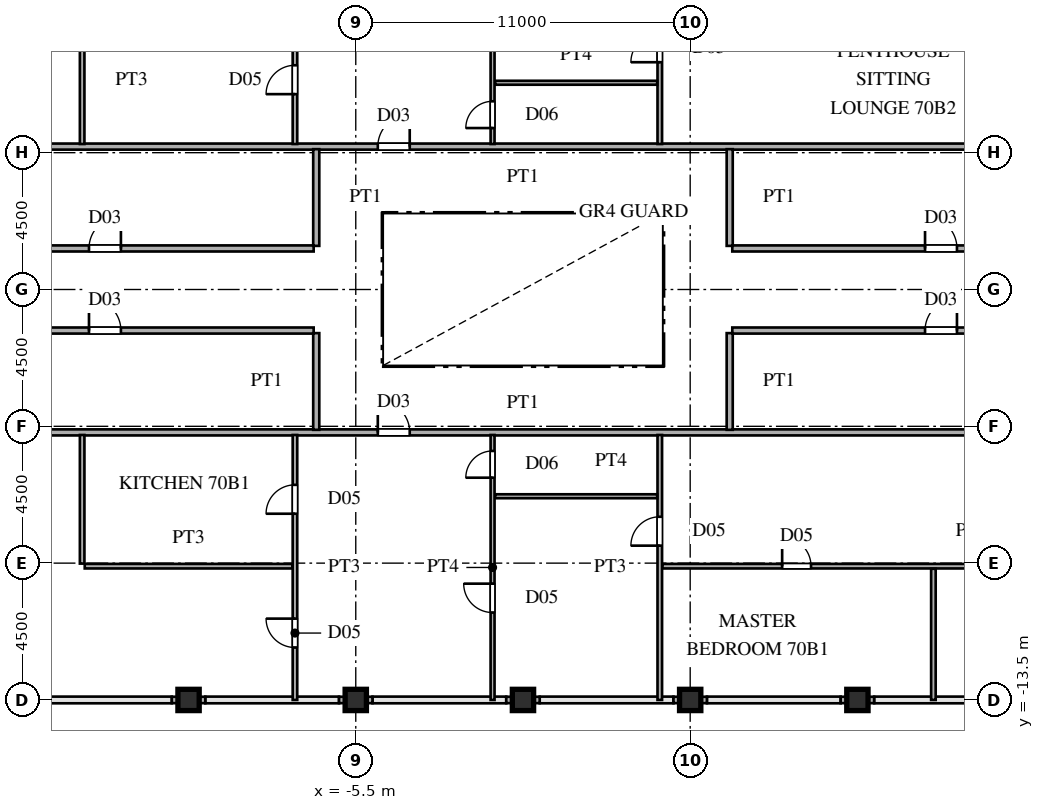
"""IFC4 building model, lengths in metres.
Left out: names, types, materials, properties, quantities, classifications, styles, units other than length and angle.
Written with IfcOpenShell. Run it as: python <this file> out.ifc"""

import sys

from ifc_helpers import new_model, si_unit, direction, frame, frame_2d, origin, origin_2d, place, context, subcontext, project, spatial, rectangle, hollow_rectangle, extrude, source, transform, mapped, element, fill, save


model = new_model("IFC4")
c1 = context("Model", 3, precision=1e-05, world=origin(), true_north=direction((0.0, 1.0)))
c2 = subcontext(c1, "Body", "Model", "MODEL_VIEW")
j1 = project(units=[si_unit("LENGTHUNIT", "METRE"), si_unit("PLANEANGLEUNIT", "RADIAN")], contexts=[c1])
p1 = place(None, origin())
s1 = spatial("IfcSite", under=j1, at=p1, CompositionType="ELEMENT")
p2 = place(p1, origin())
s2 = spatial("IfcBuilding", under=s1, at=p2, CompositionType="ELEMENT")
p3 = place(p2, frame((0.0, 0.0, 265.65)))
s3 = spatial("IfcBuildingStorey", under=s2, at=p3, CompositionType="ELEMENT", Elevation=265.65)
m1 = source(origin(), c2, "Body", "SweptSolid", [
    extrude(hollow_rectangle(XDim=0.7, YDim=0.7, WallThickness=0.03, at=origin_2d()), origin(), (0.0, 0.0, 1.0), 3.75),
])
for number, where, z_axis, x_axis in (
    (1, (-11.0, -13.5, 0.0), (0.0, 0.0, 1.0), (1.0, 0.0, 0.0)),
    (2, (-5.5, -13.5, 0.0), (0.0, 0.0, 1.0), (1.0, 0.0, 0.0)),
    (3, (0.0, -13.5, 0.0), (0.0, 0.0, 1.0), (1.0, 0.0, 0.0)),
    (4, (5.5, -13.5, 0.0), (0.0, 0.0, 1.0), (1.0, 0.0, 0.0)),
    (5, (11.0, -13.5, 0.0), (0.0, 0.0, 1.0), (1.0, 0.0, 0.0)),
):
    element("IfcColumn", number, at=place(p3, frame(where, z_axis=z_axis, x_axis=x_axis)), inside=s3, PredefinedType="COLUMN", context=c2, shape_type="MappedRepresentation", body=[
        mapped(m1, transform((0.0, 0.0, 0.0), scale=1.0)),
    ])
for number, where, z_axis, x_axis in (
    (6, (-11.55, -13.5, 0.0), (0.0, 0.0, 1.0), (1.0, 0.0, 0.0)),
    (7, (-6.05, -13.5, 0.0), (0.0, 0.0, 1.0), (1.0, 0.0, 0.0)),
    (8, (-0.55, -13.5, 0.0), (0.0, 0.0, 1.0), (1.0, 0.0, 0.0)),
    (9, (4.95, -13.5, 0.0), (0.0, 0.0, 1.0), (1.0, 0.0, 0.0)),
    (10, (10.45, -13.5, 0.0), (0.0, 0.0, 1.0), (1.0, 0.0, 0.0)),
):
    element("IfcWall", number, at=place(p3, frame(where, z_axis=z_axis, x_axis=x_axis)), inside=s3, PredefinedType="SOLIDWALL", context=c2, shape_type="SweptSolid", body=[
        extrude(rectangle(XDim=1.1, YDim=0.21, at=frame_2d((0.55, 0.0))), origin(), (0.0, 0.0, 1.0), 2.99),
    ])
p4 = place(p3, frame((-14.415, -9.1, 0.0), z_axis=(0.0, 0.0, 1.0), x_axis=(1.0, 0.0, 0.0)))
e11 = element("IfcWall", 11, at=p4, inside=s3, PredefinedType="PARTITIONING", context=c2, shape_type="SweptSolid", body=[
    extrude(rectangle(XDim=6.83, YDim=0.15, at=frame_2d((3.415, 0.0))), origin(), (0.0, 0.0, 1.0), 3.49),
])
p5 = place(p3, frame((4.585, -9.1, 0.0), z_axis=(0.0, 0.0, 1.0), x_axis=(1.0, 0.0, 0.0)))
e12 = element("IfcWall", 12, at=p5, inside=s3, PredefinedType="PARTITIONING", context=c2, shape_type="SweptSolid", body=[
    extrude(rectangle(XDim=22.66, YDim=0.15, at=frame_2d((11.33, 0.0))), origin(), (0.0, 0.0, 1.0), 3.49),
])
p6 = place(p5, frame((3.94, 0.0, 0.0)))
e13 = element("IfcOpeningElement", 13, at=p6, cuts=e12, PredefinedType="OPENING", context=c2, shape_type="SweptSolid", body=[
    extrude(rectangle(XDim=0.95, YDim=2.15, at=frame_2d((0.475, 1.075))), frame((0.0, 0.085, 0.0), z_axis=(0.0, -1.0, 0.0), x_axis=(1.0, 0.0, 0.0)), (0.0, 0.0, 1.0), 0.17),
])
p7 = place(p5, frame((11.94, 0.0, 0.0)))
e14 = element("IfcOpeningElement", 14, at=p7, cuts=e12, PredefinedType="OPENING", context=c2, shape_type="SweptSolid", body=[
    extrude(rectangle(XDim=0.95, YDim=2.15, at=frame_2d((0.475, 1.075))), frame((0.0, 0.085, 0.0), z_axis=(0.0, -1.0, 0.0), x_axis=(1.0, 0.0, 0.0)), (0.0, 0.0, 1.0), 0.17),
])
p8 = place(p5, frame((18.94, 0.0, 0.0)))
e15 = element("IfcOpeningElement", 15, at=p8, cuts=e12, PredefinedType="OPENING", context=c2, shape_type="SweptSolid", body=[
    extrude(rectangle(XDim=0.95, YDim=2.15, at=frame_2d((0.475, 1.075))), frame((0.0, 0.085, 0.0), z_axis=(0.0, -1.0, 0.0), x_axis=(1.0, 0.0, 0.0)), (0.0, 0.0, 1.0), 0.17),
])
p9 = place(p3, frame((-0.915, -6.8, 0.0), z_axis=(0.0, 0.0, 1.0), x_axis=(1.0, 0.0, 0.0)))
e16 = element("IfcWall", 16, at=p9, inside=s3, PredefinedType="PARTITIONING", context=c2, shape_type="SweptSolid", body=[
    extrude(rectangle(XDim=5.33, YDim=0.13, at=frame_2d((2.665, 0.0))), origin(), (0.0, 0.0, 1.0), 3.14),
])
p10 = place(p3, frame((-27.245, -4.7, 0.0), z_axis=(0.0, 0.0, 1.0), x_axis=(1.0, 0.0, 0.0)))
e17 = element("IfcWall", 17, at=p10, inside=s3, PredefinedType="PARTITIONING", context=c2, shape_type="SweptSolid", body=[
    extrude(rectangle(XDim=54.49, YDim=0.2, at=frame_2d((27.245, 0.0))), origin(), (0.0, 0.0, 1.0), 3.49),
])
p11 = place(p10, frame((22.47, 0.0, 0.0)))
e18 = element("IfcOpeningElement", 18, at=p11, cuts=e17, PredefinedType="OPENING", context=c2, shape_type="SweptSolid", body=[
    extrude(rectangle(XDim=1.05, YDim=2.25, at=frame_2d((0.525, 1.125))), frame((0.0, 0.11, 0.0), z_axis=(0.0, -1.0, 0.0), x_axis=(1.0, 0.0, 0.0)), (0.0, 0.0, 1.0), 0.22),
])
p12 = place(p3, frame((-27.245, -1.35, 0.0), z_axis=(0.0, 0.0, 1.0), x_axis=(1.0, 0.0, 0.0)))
e19 = element("IfcWall", 19, at=p12, inside=s3, PredefinedType="PARTITIONING", context=c2, shape_type="SweptSolid", body=[
    extrude(rectangle(XDim=20.36, YDim=0.2, at=frame_2d((10.18, 0.0))), origin(), (0.0, 0.0, 1.0), 3.49),
])
p13 = place(p12, frame((12.97, 0.0, 0.0)))
e20 = element("IfcOpeningElement", 20, at=p13, cuts=e19, PredefinedType="OPENING", context=c2, shape_type="SweptSolid", body=[
    extrude(rectangle(XDim=1.05, YDim=2.25, at=frame_2d((0.525, 1.125))), frame((0.0, 0.11, 0.0), z_axis=(0.0, -1.0, 0.0), x_axis=(1.0, 0.0, 0.0)), (0.0, 0.0, 1.0), 0.22),
])
p14 = place(p3, frame((6.885, -1.35, 0.0), z_axis=(0.0, 0.0, 1.0), x_axis=(1.0, 0.0, 0.0)))
e21 = element("IfcWall", 21, at=p14, inside=s3, PredefinedType="PARTITIONING", context=c2, shape_type="SweptSolid", body=[
    extrude(rectangle(XDim=20.36, YDim=0.2, at=frame_2d((10.18, 0.0))), origin(), (0.0, 0.0, 1.0), 3.49),
])
p15 = place(p14, frame((6.34, 0.0, 0.0)))
e22 = element("IfcOpeningElement", 22, at=p15, cuts=e21, PredefinedType="OPENING", context=c2, shape_type="SweptSolid", body=[
    extrude(rectangle(XDim=1.05, YDim=2.25, at=frame_2d((0.525, 1.125))), frame((0.0, 0.11, 0.0), z_axis=(0.0, -1.0, 0.0), x_axis=(1.0, 0.0, 0.0)), (0.0, 0.0, 1.0), 0.22),
])
p16 = place(p3, frame((-27.245, 1.35, 0.0), z_axis=(0.0, 0.0, 1.0), x_axis=(1.0, 0.0, 0.0)))
e23 = element("IfcWall", 23, at=p16, inside=s3, PredefinedType="PARTITIONING", context=c2, shape_type="SweptSolid", body=[
    extrude(rectangle(XDim=20.36, YDim=0.2, at=frame_2d((10.18, 0.0))), origin(), (0.0, 0.0, 1.0), 3.49),
])
p17 = place(p16, frame((12.97, 0.0, 0.0)))
e24 = element("IfcOpeningElement", 24, at=p17, cuts=e23, PredefinedType="OPENING", context=c2, shape_type="SweptSolid", body=[
    extrude(rectangle(XDim=1.05, YDim=2.25, at=frame_2d((0.525, 1.125))), frame((0.0, 0.11, 0.0), z_axis=(0.0, -1.0, 0.0), x_axis=(1.0, 0.0, 0.0)), (0.0, 0.0, 1.0), 0.22),
])
p18 = place(p3, frame((6.885, 1.35, 0.0), z_axis=(0.0, 0.0, 1.0), x_axis=(1.0, 0.0, 0.0)))
e25 = element("IfcWall", 25, at=p18, inside=s3, PredefinedType="PARTITIONING", context=c2, shape_type="SweptSolid", body=[
    extrude(rectangle(XDim=20.36, YDim=0.2, at=frame_2d((10.18, 0.0))), origin(), (0.0, 0.0, 1.0), 3.49),
])
p19 = place(p18, frame((6.34, 0.0, 0.0)))
e26 = element("IfcOpeningElement", 26, at=p19, cuts=e25, PredefinedType="OPENING", context=c2, shape_type="SweptSolid", body=[
    extrude(rectangle(XDim=1.05, YDim=2.25, at=frame_2d((0.525, 1.125))), frame((0.0, 0.11, 0.0), z_axis=(0.0, -1.0, 0.0), x_axis=(1.0, 0.0, 0.0)), (0.0, 0.0, 1.0), 0.22),
])
p20 = place(p3, frame((-27.245, 4.7, 0.0), z_axis=(0.0, 0.0, 1.0), x_axis=(1.0, 0.0, 0.0)))
e27 = element("IfcWall", 27, at=p20, inside=s3, PredefinedType="PARTITIONING", context=c2, shape_type="SweptSolid", body=[
    extrude(rectangle(XDim=54.49, YDim=0.2, at=frame_2d((27.245, 0.0))), origin(), (0.0, 0.0, 1.0), 3.49),
])
p21 = place(p20, frame((22.47, 0.0, 0.0)))
e28 = element("IfcOpeningElement", 28, at=p21, cuts=e27, PredefinedType="OPENING", context=c2, shape_type="SweptSolid", body=[
    extrude(rectangle(XDim=1.05, YDim=2.25, at=frame_2d((0.525, 1.125))), frame((0.0, 0.11, 0.0), z_axis=(0.0, -1.0, 0.0), x_axis=(1.0, 0.0, 0.0)), (0.0, 0.0, 1.0), 0.22),
])
p22 = place(p3, frame((-0.915, 6.8, 0.0), z_axis=(0.0, 0.0, 1.0), x_axis=(1.0, 0.0, 0.0)))
e29 = element("IfcWall", 29, at=p22, inside=s3, PredefinedType="PARTITIONING", context=c2, shape_type="SweptSolid", body=[
    extrude(rectangle(XDim=5.33, YDim=0.13, at=frame_2d((2.665, 0.0))), origin(), (0.0, 0.0, 1.0), 3.14),
])
for number, where, z_axis, x_axis in (
    (30, (-14.5, -9.015, 0.0), (0.0, 0.0, 1.0), (0.0, 1.0, 0.0)),
    (31, (-14.5, 4.785, 0.0), (0.0, 0.0, 1.0), (0.0, 1.0, 0.0)),
):
    element("IfcWall", number, at=place(p3, frame(where, z_axis=z_axis, x_axis=x_axis)), inside=s3, PredefinedType="PARTITIONING", context=c2, shape_type="SweptSolid", body=[
        extrude(rectangle(XDim=4.23, YDim=0.15, at=frame_2d((2.115, 0.0))), origin(), (0.0, 0.0, 1.0), 3.49),
    ])
p23 = place(p3, frame((-7.5, -13.5, 0.0), z_axis=(0.0, 0.0, 1.0), x_axis=(0.0, 1.0, 0.0)))
e32 = element("IfcWall", 32, at=p23, inside=s3, PredefinedType="PARTITIONING", context=c2, shape_type="SweptSolid", body=[
    extrude(rectangle(XDim=8.715, YDim=0.15, at=frame_2d((4.357, 0.0))), origin(), (0.0, 0.0, 1.0), 3.49),
])
p24 = place(p23, frame((6.125, 0.0, 0.0)))
e33 = element("IfcOpeningElement", 33, at=p24, cuts=e32, PredefinedType="OPENING", context=c2, shape_type="SweptSolid", body=[
    extrude(rectangle(XDim=0.95, YDim=2.15, at=frame_2d((0.475, 1.075))), frame((0.0, 0.085, 0.0), z_axis=(0.0, -1.0, 0.0), x_axis=(1.0, 0.0, 0.0)), (0.0, 0.0, 1.0), 0.17),
])
p25 = place(p23, frame((1.725, 0.0, 0.0)))
e34 = element("IfcOpeningElement", 34, at=p25, cuts=e32, PredefinedType="OPENING", context=c2, shape_type="SweptSolid", body=[
    extrude(rectangle(XDim=0.95, YDim=2.15, at=frame_2d((0.475, 1.075))), frame((0.0, 0.085, 0.0), z_axis=(0.0, -1.0, 0.0), x_axis=(1.0, 0.0, 0.0)), (0.0, 0.0, 1.0), 0.17),
])
p26 = place(p3, frame((-7.5, 4.785, 0.0), z_axis=(0.0, 0.0, 1.0), x_axis=(0.0, 1.0, 0.0)))
e35 = element("IfcWall", 35, at=p26, inside=s3, PredefinedType="PARTITIONING", context=c2, shape_type="SweptSolid", body=[
    extrude(rectangle(XDim=8.715, YDim=0.15, at=frame_2d((4.357, 0.0))), origin(), (0.0, 0.0, 1.0), 3.49),
])
p27 = place(p26, frame((1.64, 0.0, 0.0)))
e36 = element("IfcOpeningElement", 36, at=p27, cuts=e35, PredefinedType="OPENING", context=c2, shape_type="SweptSolid", body=[
    extrude(rectangle(XDim=0.95, YDim=2.15, at=frame_2d((0.475, 1.075))), frame((0.0, 0.085, 0.0), z_axis=(0.0, -1.0, 0.0), x_axis=(1.0, 0.0, 0.0)), (0.0, 0.0, 1.0), 0.17),
])
p28 = place(p26, frame((6.04, 0.0, 0.0)))
e37 = element("IfcOpeningElement", 37, at=p28, cuts=e35, PredefinedType="OPENING", context=c2, shape_type="SweptSolid", body=[
    extrude(rectangle(XDim=0.95, YDim=2.15, at=frame_2d((0.475, 1.075))), frame((0.0, 0.085, 0.0), z_axis=(0.0, -1.0, 0.0), x_axis=(1.0, 0.0, 0.0)), (0.0, 0.0, 1.0), 0.17),
])
for number, where, z_axis, x_axis in (
    (38, (-6.8, -4.615, 0.0), (0.0, 0.0, 1.0), (0.0, 1.0, 0.0)),
    (39, (-6.8, 1.435, 0.0), (0.0, 0.0, 1.0), (0.0, 1.0, 0.0)),
):
    element("IfcWall", number, at=place(p3, frame(where, z_axis=z_axis, x_axis=x_axis)), inside=s3, PredefinedType="PARTITIONING", context=c2, shape_type="SweptSolid", body=[
        extrude(rectangle(XDim=3.18, YDim=0.2, at=frame_2d((1.59, 0.0))), origin(), (0.0, 0.0, 1.0), 3.49),
    ])
p29 = place(p3, frame((-1.0, -13.5, 0.0), z_axis=(0.0, 0.0, 1.0), x_axis=(0.0, 1.0, 0.0)))
e40 = element("IfcWall", 40, at=p29, inside=s3, PredefinedType="PARTITIONING", context=c2, shape_type="SweptSolid", body=[
    extrude(rectangle(XDim=8.715, YDim=0.13, at=frame_2d((4.357, 0.0))), origin(), (0.0, 0.0, 1.0), 3.49),
])
p30 = place(p29, frame((7.31, 0.0, 0.0)))
e41 = element("IfcOpeningElement", 41, at=p30, cuts=e40, PredefinedType="OPENING", context=c2, shape_type="SweptSolid", body=[
    extrude(rectangle(XDim=0.88, YDim=2.1, at=frame_2d((0.44, 1.05))), frame((0.0, 0.075, 0.0), z_axis=(0.0, -1.0, 0.0), x_axis=(1.0, 0.0, 0.0)), (0.0, 0.0, 1.0), 0.15),
])
p31 = place(p29, frame((2.875, 0.0, 0.0)))
e42 = element("IfcOpeningElement", 42, at=p31, cuts=e40, PredefinedType="OPENING", context=c2, shape_type="SweptSolid", body=[
    extrude(rectangle(XDim=0.95, YDim=2.15, at=frame_2d((0.475, 1.075))), frame((0.0, 0.075, 0.0), z_axis=(0.0, -1.0, 0.0), x_axis=(1.0, 0.0, 0.0)), (0.0, 0.0, 1.0), 0.15),
])
p32 = place(p3, frame((-1.0, 4.785, 0.0), z_axis=(0.0, 0.0, 1.0), x_axis=(0.0, 1.0, 0.0)))
e43 = element("IfcWall", 43, at=p32, inside=s3, PredefinedType="PARTITIONING", context=c2, shape_type="SweptSolid", body=[
    extrude(rectangle(XDim=8.715, YDim=0.13, at=frame_2d((4.357, 0.0))), origin(), (0.0, 0.0, 1.0), 3.49),
])
p33 = place(p32, frame((0.525, 0.0, 0.0)))
e44 = element("IfcOpeningElement", 44, at=p33, cuts=e43, PredefinedType="OPENING", context=c2, shape_type="SweptSolid", body=[
    extrude(rectangle(XDim=0.88, YDim=2.1, at=frame_2d((0.44, 1.05))), frame((0.0, 0.075, 0.0), z_axis=(0.0, -1.0, 0.0), x_axis=(1.0, 0.0, 0.0)), (0.0, 0.0, 1.0), 0.15),
])
p34 = place(p32, frame((4.89, 0.0, 0.0)))
e45 = element("IfcOpeningElement", 45, at=p34, cuts=e43, PredefinedType="OPENING", context=c2, shape_type="SweptSolid", body=[
    extrude(rectangle(XDim=0.95, YDim=2.15, at=frame_2d((0.475, 1.075))), frame((0.0, 0.075, 0.0), z_axis=(0.0, -1.0, 0.0), x_axis=(1.0, 0.0, 0.0)), (0.0, 0.0, 1.0), 0.15),
])
p35 = place(p3, frame((4.5, -13.5, 0.0), z_axis=(0.0, 0.0, 1.0), x_axis=(0.0, 1.0, 0.0)))
e46 = element("IfcWall", 46, at=p35, inside=s3, PredefinedType="PARTITIONING", context=c2, shape_type="SweptSolid", body=[
    extrude(rectangle(XDim=8.715, YDim=0.15, at=frame_2d((4.357, 0.0))), origin(), (0.0, 0.0, 1.0), 3.49),
])
p36 = place(p35, frame((5.075, 0.0, 0.0)))
e47 = element("IfcOpeningElement", 47, at=p36, cuts=e46, PredefinedType="OPENING", context=c2, shape_type="SweptSolid", body=[
    extrude(rectangle(XDim=0.95, YDim=2.15, at=frame_2d((0.475, 1.075))), frame((0.0, 0.085, 0.0), z_axis=(0.0, -1.0, 0.0), x_axis=(1.0, 0.0, 0.0)), (0.0, 0.0, 1.0), 0.17),
])
p37 = place(p3, frame((4.5, 4.785, 0.0), z_axis=(0.0, 0.0, 1.0), x_axis=(0.0, 1.0, 0.0)))
e48 = element("IfcWall", 48, at=p37, inside=s3, PredefinedType="PARTITIONING", context=c2, shape_type="SweptSolid", body=[
    extrude(rectangle(XDim=8.715, YDim=0.15, at=frame_2d((4.357, 0.0))), origin(), (0.0, 0.0, 1.0), 3.49),
])
p38 = place(p37, frame((2.69, 0.0, 0.0)))
e49 = element("IfcOpeningElement", 49, at=p38, cuts=e48, PredefinedType="OPENING", context=c2, shape_type="SweptSolid", body=[
    extrude(rectangle(XDim=0.95, YDim=2.15, at=frame_2d((0.475, 1.075))), frame((0.0, 0.085, 0.0), z_axis=(0.0, -1.0, 0.0), x_axis=(1.0, 0.0, 0.0)), (0.0, 0.0, 1.0), 0.17),
])
for number, where, z_axis, x_axis in (
    (50, (6.8, -4.615, 0.0), (0.0, 0.0, 1.0), (0.0, 1.0, 0.0)),
    (51, (6.8, 1.435, 0.0), (0.0, 0.0, 1.0), (0.0, 1.0, 0.0)),
):
    element("IfcWall", number, at=place(p3, frame(where, z_axis=z_axis, x_axis=x_axis)), inside=s3, PredefinedType="PARTITIONING", context=c2, shape_type="SweptSolid", body=[
        extrude(rectangle(XDim=3.18, YDim=0.2, at=frame_2d((1.59, 0.0))), origin(), (0.0, 0.0, 1.0), 3.49),
    ])
p39 = place(p3, frame((13.5, -13.5, 0.0), z_axis=(0.0, 0.0, 1.0), x_axis=(0.0, 1.0, 0.0)))
e52 = element("IfcWall", 52, at=p39, inside=s3, PredefinedType="PARTITIONING", context=c2, shape_type="SweptSolid", body=[
    extrude(rectangle(XDim=4.315, YDim=0.15, at=frame_2d((2.157, 0.0))), origin(), (0.0, 0.0, 1.0), 3.49),
])
m2 = source(origin(), c2, "Body", "SweptSolid", [
    extrude(rectangle(XDim=0.95, YDim=2.15, at=frame_2d((0.475, 1.075))), frame((0.0, 0.025, 0.0), z_axis=(0.0, -1.0, 0.0), x_axis=(1.0, 0.0, 0.0)), (0.0, 0.0, 1.0), 0.05),
])
p40 = place(p6, origin())
e53 = element("IfcDoor", 53, at=p40, inside=s3, OperationType="SINGLE_SWING_LEFT", PredefinedType="DOOR", context=c2, shape_type="MappedRepresentation", body=[
    mapped(m2, transform((0.0, 0.0, 0.0), scale=1.0)),
])
fill(e13, e53)
m3 = source(origin(), c2, "Body", "SweptSolid", [
    extrude(rectangle(XDim=1.05, YDim=2.25, at=frame_2d((0.525, 1.125))), frame((0.0, 0.025, 0.0), z_axis=(0.0, -1.0, 0.0), x_axis=(1.0, 0.0, 0.0)), (0.0, 0.0, 1.0), 0.05),
])
p41 = place(p11, origin())
e54 = element("IfcDoor", 54, at=p41, inside=s3, OperationType="SINGLE_SWING_LEFT", PredefinedType="DOOR", context=c2, shape_type="MappedRepresentation", body=[
    mapped(m3, transform((0.0, 0.0, 0.0), scale=1.0)),
])
fill(e18, e54)
p42 = place(p13, origin())
e55 = element("IfcDoor", 55, at=p42, inside=s3, OperationType="SINGLE_SWING_LEFT", PredefinedType="DOOR", context=c2, shape_type="MappedRepresentation", body=[
    mapped(m3, transform((0.0, 0.0, 0.0), scale=1.0)),
])
fill(e20, e55)
p43 = place(p15, origin())
e56 = element("IfcDoor", 56, at=p43, inside=s3, OperationType="SINGLE_SWING_RIGHT", PredefinedType="DOOR", context=c2, shape_type="MappedRepresentation", body=[
    mapped(m3, transform((0.0, 0.0, 0.0), scale=1.0)),
])
fill(e22, e56)
p44 = place(p17, origin())
e57 = element("IfcDoor", 57, at=p44, inside=s3, OperationType="SINGLE_SWING_RIGHT", PredefinedType="DOOR", context=c2, shape_type="MappedRepresentation", body=[
    mapped(m3, transform((0.0, 0.0, 0.0), scale=1.0)),
])
fill(e24, e57)
p45 = place(p19, origin())
e58 = element("IfcDoor", 58, at=p45, inside=s3, OperationType="SINGLE_SWING_LEFT", PredefinedType="DOOR", context=c2, shape_type="MappedRepresentation", body=[
    mapped(m3, transform((0.0, 0.0, 0.0), scale=1.0)),
])
fill(e26, e58)
p46 = place(p21, origin())
e59 = element("IfcDoor", 59, at=p46, inside=s3, OperationType="SINGLE_SWING_RIGHT", PredefinedType="DOOR", context=c2, shape_type="MappedRepresentation", body=[
    mapped(m3, transform((0.0, 0.0, 0.0), scale=1.0)),
])
fill(e28, e59)
p47 = place(p24, origin())
e60 = element("IfcDoor", 60, at=p47, inside=s3, OperationType="SINGLE_SWING_LEFT", PredefinedType="DOOR", context=c2, shape_type="MappedRepresentation", body=[
    mapped(m2, transform((0.0, 0.0, 0.0), scale=1.0)),
])
fill(e33, e60)
p48 = place(p25, origin())
e61 = element("IfcDoor", 61, at=p48, inside=s3, OperationType="SINGLE_SWING_RIGHT", PredefinedType="DOOR", context=c2, shape_type="MappedRepresentation", body=[
    mapped(m2, transform((0.0, 0.0, 0.0), scale=1.0)),
])
fill(e34, e61)
p49 = place(p27, origin())
e62 = element("IfcDoor", 62, at=p49, inside=s3, OperationType="SINGLE_SWING_LEFT", PredefinedType="DOOR", context=c2, shape_type="MappedRepresentation", body=[
    mapped(m2, transform((0.0, 0.0, 0.0), scale=1.0)),
])
fill(e36, e62)
m4 = source(origin(), c2, "Body", "SweptSolid", [
    extrude(rectangle(XDim=0.88, YDim=2.1, at=frame_2d((0.44, 1.05))), frame((0.0, 0.025, 0.0), z_axis=(0.0, -1.0, 0.0), x_axis=(1.0, 0.0, 0.0)), (0.0, 0.0, 1.0), 0.05),
])
p50 = place(p30, origin())
e63 = element("IfcDoor", 63, at=p50, inside=s3, OperationType="SINGLE_SWING_LEFT", PredefinedType="DOOR", context=c2, shape_type="MappedRepresentation", body=[
    mapped(m4, transform((0.0, 0.0, 0.0), scale=1.0)),
])
fill(e41, e63)
p51 = place(p31, origin())
e64 = element("IfcDoor", 64, at=p51, inside=s3, OperationType="SINGLE_SWING_RIGHT", PredefinedType="DOOR", context=c2, shape_type="MappedRepresentation", body=[
    mapped(m2, transform((0.0, 0.0, 0.0), scale=1.0)),
])
fill(e42, e64)
p52 = place(p33, origin())
e65 = element("IfcDoor", 65, at=p52, inside=s3, OperationType="SINGLE_SWING_LEFT", PredefinedType="DOOR", context=c2, shape_type="MappedRepresentation", body=[
    mapped(m4, transform((0.0, 0.0, 0.0), scale=1.0)),
])
fill(e44, e65)
p53 = place(p36, origin())
e66 = element("IfcDoor", 66, at=p53, inside=s3, OperationType="SINGLE_SWING_LEFT", PredefinedType="DOOR", context=c2, shape_type="MappedRepresentation", body=[
    mapped(m2, transform((0.0, 0.0, 0.0), scale=1.0)),
])
fill(e47, e66)
p54 = place(p38, origin())
e67 = element("IfcDoor", 67, at=p54, inside=s3, OperationType="SINGLE_SWING_LEFT", PredefinedType="DOOR", context=c2, shape_type="MappedRepresentation", body=[
    mapped(m2, transform((0.0, 0.0, 0.0), scale=1.0)),
])
fill(e49, e67)
save(model, sys.argv[1])
